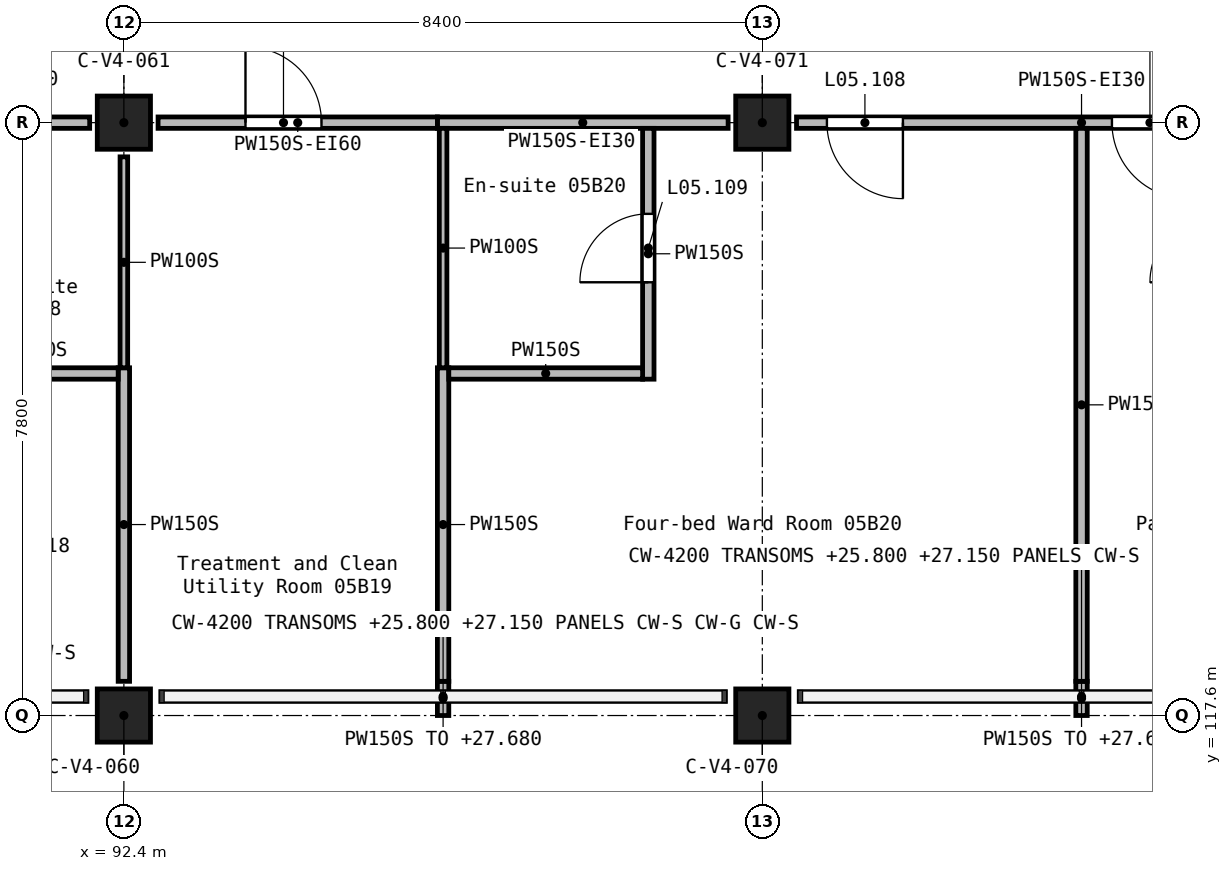
"""IFC4 building model, lengths in metres.
Left out: names, types, materials, properties, quantities, classifications, styles, units other than length and angle.
Written with IfcOpenShell. Run it as: python <this file> out.ifc"""

import sys

from ifc_helpers import new_model, si_unit, direction, frame, frame_2d, origin, origin_2d, place, context, subcontext, project, spatial, rectangle, extrude, element, fill, save


model = new_model("IFC4")
c1 = context("Model", 3, precision=1e-05, world=origin(), true_north=direction((0.0, 1.0)))
c2 = subcontext(c1, "Body", "Model", "MODEL_VIEW")
j1 = project(units=[si_unit("LENGTHUNIT", "METRE"), si_unit("PLANEANGLEUNIT", "RADIAN")], contexts=[c1])
p1 = place(None, origin())
s1 = spatial("IfcSite", under=j1, at=p1, CompositionType="ELEMENT")
p2 = place(p1, origin())
s2 = spatial("IfcBuilding", under=s1, at=p2, CompositionType="ELEMENT")
p3 = place(p2, frame((0.0, 0.0, 24.9)))
s3 = spatial("IfcBuildingStorey", under=s2, at=p3, CompositionType="ELEMENT", Elevation=24.9)
for number, where, z_axis, x_axis in (
    (1, (92.4, 117.6, 0.0), (0.0, 0.0, 1.0), (1.0, 0.0, 0.0)),
    (2, (92.4, 125.4, 0.0), (0.0, 0.0, 1.0), (1.0, 0.0, 0.0)),
    (3, (100.8, 117.6, 0.0), (0.0, 0.0, 1.0), (1.0, 0.0, 0.0)),
    (4, (100.8, 125.4, 0.0), (0.0, 0.0, 1.0), (1.0, 0.0, 0.0)),
):
    element("IfcColumn", number, at=place(p3, frame(where, z_axis=z_axis, x_axis=x_axis)), inside=s3, PredefinedType="COLUMN", context=c2, shape_type="SweptSolid", body=[
        extrude(rectangle(XDim=0.7, YDim=0.7, at=origin_2d()), origin(), (0.0, 0.0, 1.0), 3.9),
    ])
p4 = place(p3, frame((108.75, 125.4, 0.0), z_axis=(0.0, 0.0, 1.0), x_axis=(-1.0, 0.0, 0.0)))
e5 = element("IfcWall", 5, at=p4, inside=s3, PredefinedType="PARTITIONING", context=c2, shape_type="SweptSolid", body=[
    extrude(rectangle(XDim=7.5, YDim=0.15, at=frame_2d((3.75, 0.0))), origin(), (0.0, 0.0, 1.0), 3.6),
])
p5 = place(p4, frame((6.1, 0.0, 0.0)))
e6 = element("IfcOpeningElement", 6, at=p5, cuts=e5, PredefinedType="OPENING", context=c2, shape_type="SweptSolid", body=[
    extrude(rectangle(XDim=1.0, YDim=2.1, at=frame_2d((0.5, 1.05))), frame((0.0, 0.085, 0.0), z_axis=(0.0, -1.0, 0.0), x_axis=(1.0, 0.0, 0.0)), (0.0, 0.0, 1.0), 0.17),
])
p6 = place(p4, frame((2.35, 0.0, 0.0)))
e7 = element("IfcOpeningElement", 7, at=p6, cuts=e5, PredefinedType="OPENING", context=c2, shape_type="SweptSolid", body=[
    extrude(rectangle(XDim=1.0, YDim=2.1, at=frame_2d((0.5, 1.05))), frame((0.0, 0.085, 0.0), z_axis=(0.0, -1.0, 0.0), x_axis=(1.0, 0.0, 0.0)), (0.0, 0.0, 1.0), 0.17),
])
p7 = place(p3, frame((100.35, 125.4, 0.0), z_axis=(0.0, 0.0, 1.0), x_axis=(-1.0, 0.0, 0.0)))
e8 = element("IfcWall", 8, at=p7, inside=s3, PredefinedType="PARTITIONING", context=c2, shape_type="SweptSolid", body=[
    extrude(rectangle(XDim=3.825, YDim=0.15, at=frame_2d((1.913, 0.0))), origin(), (0.0, 0.0, 1.0), 3.6),
])
p8 = place(p3, frame((88.3, 125.4, 0.0), z_axis=(0.0, 0.0, 1.0), x_axis=(1.0, 0.0, 0.0)))
e9 = element("IfcWall", 9, at=p8, inside=s3, PredefinedType="PARTITIONING", context=c2, shape_type="SweptSolid", body=[
    extrude(rectangle(XDim=3.65, YDim=0.15, at=frame_2d((1.825, 0.0))), origin(), (0.0, 0.0, 1.0), 3.6),
])
p9 = place(p8, frame((0.3, 0.0, 0.0)))
e10 = element("IfcOpeningElement", 10, at=p9, cuts=e9, PredefinedType="OPENING", context=c2, shape_type="SweptSolid", body=[
    extrude(rectangle(XDim=1.0, YDim=2.1, at=frame_2d((0.5, 1.05))), frame((0.0, 0.085, 0.0), z_axis=(0.0, -1.0, 0.0), x_axis=(1.0, 0.0, 0.0)), (0.0, 0.0, 1.0), 0.17),
])
p10 = place(p3, frame((92.85, 125.4, 0.0), z_axis=(0.0, 0.0, 1.0), x_axis=(1.0, 0.0, 0.0)))
e11 = element("IfcWall", 11, at=p10, inside=s3, PredefinedType="PARTITIONING", context=c2, shape_type="SweptSolid", body=[
    extrude(rectangle(XDim=3.675, YDim=0.15, at=frame_2d((1.837, 0.0))), origin(), (0.0, 0.0, 1.0), 3.6),
])
p11 = place(p10, frame((1.15, 0.0, 0.0)))
e12 = element("IfcOpeningElement", 12, at=p11, cuts=e11, PredefinedType="OPENING", context=c2, shape_type="SweptSolid", body=[
    extrude(rectangle(XDim=1.0, YDim=2.1, at=frame_2d((0.5, 1.05))), frame((0.0, 0.085, 0.0), z_axis=(0.0, -1.0, 0.0), x_axis=(1.0, 0.0, 0.0)), (0.0, 0.0, 1.0), 0.17),
])
p12 = place(p3, frame((105.0, 117.6, 0.0), z_axis=(0.0, 0.0, 1.0), x_axis=(0.0, 1.0, 0.0)))
e13 = element("IfcWall", 13, at=p12, inside=s3, PredefinedType="PARTITIONING", context=c2, shape_type="SweptSolid", body=[
    extrude(rectangle(XDim=0.45, YDim=0.15, at=frame_2d((0.225, 0.0))), origin(), (0.0, 0.0, 1.0), 2.78),
])
p13 = place(p3, frame((105.0, 118.05, 0.0), z_axis=(0.0, 0.0, 1.0), x_axis=(0.0, 1.0, 0.0)))
e14 = element("IfcWall", 14, at=p13, inside=s3, PredefinedType="PARTITIONING", context=c2, shape_type="SweptSolid", body=[
    extrude(rectangle(XDim=7.275, YDim=0.15, at=frame_2d((3.637, 0.0))), origin(), (0.0, 0.0, 1.0), 3.6),
])
p14 = place(p3, frame((92.4, 118.05, 0.0), z_axis=(0.0, 0.0, 1.0), x_axis=(0.0, 1.0, 0.0)))
e15 = element("IfcWall", 15, at=p14, inside=s3, PredefinedType="PARTITIONING", context=c2, shape_type="SweptSolid", body=[
    extrude(rectangle(XDim=4.125, YDim=0.15, at=frame_2d((2.062, 0.0))), origin(), (0.0, 0.0, 1.0), 3.6),
])
p15 = place(p3, frame((96.6, 117.6, 0.0), z_axis=(0.0, 0.0, 1.0), x_axis=(0.0, 1.0, 0.0)))
e16 = element("IfcWall", 16, at=p15, inside=s3, PredefinedType="PARTITIONING", context=c2, shape_type="SweptSolid", body=[
    extrude(rectangle(XDim=0.45, YDim=0.15, at=frame_2d((0.225, 0.0))), origin(), (0.0, 0.0, 1.0), 2.78),
])
p16 = place(p3, frame((96.6, 118.05, 0.0), z_axis=(0.0, 0.0, 1.0), x_axis=(0.0, 1.0, 0.0)))
e17 = element("IfcWall", 17, at=p16, inside=s3, PredefinedType="PARTITIONING", context=c2, shape_type="SweptSolid", body=[
    extrude(rectangle(XDim=4.125, YDim=0.15, at=frame_2d((2.062, 0.0))), origin(), (0.0, 0.0, 1.0), 3.6),
])
p17 = place(p3, frame((99.3, 122.025, 0.0), z_axis=(0.0, 0.0, 1.0), x_axis=(0.0, 1.0, 0.0)))
e18 = element("IfcWall", 18, at=p17, inside=s3, PredefinedType="PARTITIONING", context=c2, shape_type="SweptSolid", body=[
    extrude(rectangle(XDim=3.3, YDim=0.15, at=frame_2d((1.65, 0.0))), origin(), (0.0, 0.0, 1.0), 3.6),
])
p18 = place(p17, frame((1.275, 0.0, 0.0)))
e19 = element("IfcOpeningElement", 19, at=p18, cuts=e18, PredefinedType="OPENING", context=c2, shape_type="SweptSolid", body=[
    extrude(rectangle(XDim=0.9, YDim=2.1, at=frame_2d((0.45, 1.05))), frame((0.0, 0.085, 0.0), z_axis=(0.0, -1.0, 0.0), x_axis=(1.0, 0.0, 0.0)), (0.0, 0.0, 1.0), 0.17),
])
p19 = place(p3, frame((96.675, 122.1, 0.0), z_axis=(0.0, 0.0, 1.0), x_axis=(1.0, 0.0, 0.0)))
e20 = element("IfcWall", 20, at=p19, inside=s3, PredefinedType="PARTITIONING", context=c2, shape_type="SweptSolid", body=[
    extrude(rectangle(XDim=2.55, YDim=0.15, at=frame_2d((1.275, 0.0))), origin(), (0.0, 0.0, 1.0), 3.6),
])
p20 = place(p3, frame((90.075, 122.1, 0.0), z_axis=(0.0, 0.0, 1.0), x_axis=(1.0, 0.0, 0.0)))
e21 = element("IfcWall", 21, at=p20, inside=s3, PredefinedType="PARTITIONING", context=c2, shape_type="SweptSolid", body=[
    extrude(rectangle(XDim=2.25, YDim=0.15, at=frame_2d((1.125, 0.0))), origin(), (0.0, 0.0, 1.0), 3.6),
])
p21 = place(p3, frame((92.4, 122.175, 0.0), z_axis=(0.0, 0.0, 1.0), x_axis=(0.0, 1.0, 0.0)))
e22 = element("IfcWall", 22, at=p21, inside=s3, PredefinedType="PARTITIONING", context=c2, shape_type="SweptSolid", body=[
    extrude(rectangle(XDim=2.775, YDim=0.1, at=frame_2d((1.387, 0.0))), origin(), (0.0, 0.0, 1.0), 3.6),
])
p22 = place(p3, frame((96.6, 122.175, 0.0), z_axis=(0.0, 0.0, 1.0), x_axis=(0.0, 1.0, 0.0)))
e23 = element("IfcWall", 23, at=p22, inside=s3, PredefinedType="PARTITIONING", context=c2, shape_type="SweptSolid", body=[
    extrude(rectangle(XDim=3.15, YDim=0.1, at=frame_2d((1.575, 0.0))), origin(), (0.0, 0.0, 1.0), 3.6),
])
p23 = place(p11, frame((1.0, 0.0, 0.0), z_axis=(0.0, 0.0, 1.0), x_axis=(-1.0, 0.0, 0.0)))
e24 = element("IfcDoor", 24, at=p23, inside=s3, OperationType="SINGLE_SWING_RIGHT", PredefinedType="DOOR", context=c2, shape_type="SweptSolid", body=[
    extrude(rectangle(XDim=1.0, YDim=2.1, at=frame_2d((0.5, 1.05))), frame((0.0, 0.025, 0.0), z_axis=(0.0, -1.0, 0.0), x_axis=(1.0, 0.0, 0.0)), (0.0, 0.0, 1.0), 0.05),
])
fill(e12, e24)
p24 = place(p5, origin())
e25 = element("IfcDoor", 25, at=p24, inside=s3, OperationType="SINGLE_SWING_RIGHT", PredefinedType="DOOR", context=c2, shape_type="SweptSolid", body=[
    extrude(rectangle(XDim=1.0, YDim=2.1, at=frame_2d((0.5, 1.05))), frame((0.0, 0.025, 0.0), z_axis=(0.0, -1.0, 0.0), x_axis=(1.0, 0.0, 0.0)), (0.0, 0.0, 1.0), 0.05),
])
fill(e6, e25)
p25 = place(p18, origin())
e26 = element("IfcDoor", 26, at=p25, inside=s3, OperationType="SINGLE_SWING_RIGHT", PredefinedType="DOOR", context=c2, shape_type="SweptSolid", body=[
    extrude(rectangle(XDim=0.9, YDim=2.1, at=frame_2d((0.45, 1.05))), frame((0.0, 0.025, 0.0), z_axis=(0.0, -1.0, 0.0), x_axis=(1.0, 0.0, 0.0)), (0.0, 0.0, 1.0), 0.05),
])
fill(e19, e26)
p26 = place(p6, origin())
e27 = element("IfcDoor", 27, at=p26, inside=s3, OperationType="SINGLE_SWING_LEFT", PredefinedType="DOOR", context=c2, shape_type="SweptSolid", body=[
    extrude(rectangle(XDim=1.0, YDim=2.1, at=frame_2d((0.5, 1.05))), frame((0.0, 0.025, 0.0), z_axis=(0.0, -1.0, 0.0), x_axis=(1.0, 0.0, 0.0)), (0.0, 0.0, 1.0), 0.05),
])
fill(e7, e27)
save(model, sys.argv[1])
